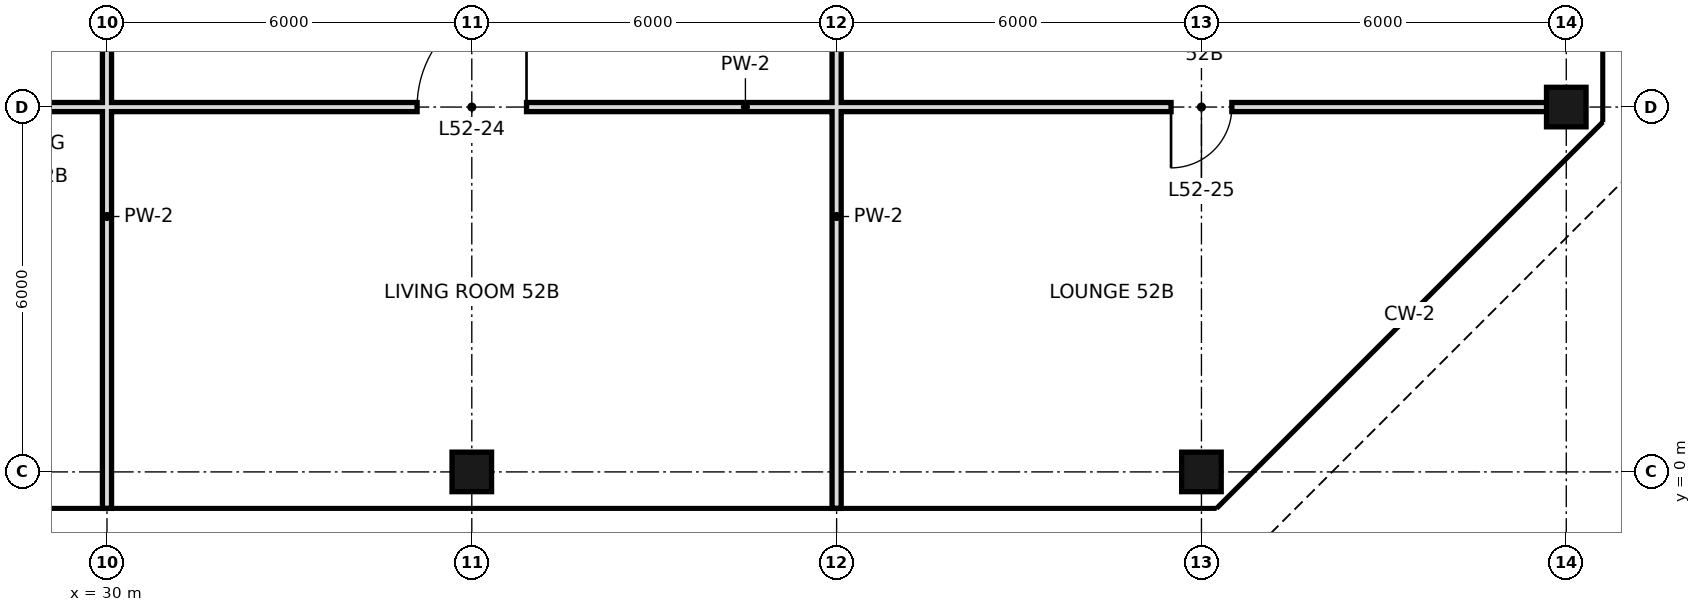
"""IFC4 building model, lengths in metres.
Left out: names, types, materials, properties, quantities, classifications, styles, units other than length and angle.
Written with IfcOpenShell. Run it as: python <this file> out.ifc"""

import sys

from ifc_helpers import new_model, si_unit, direction, frame, frame_2d, origin, origin_2d, place, context, subcontext, project, spatial, rectangle, hollow_rectangle, extrude, element, fill, save


model = new_model("IFC4")
c1 = context("Model", 3, precision=1e-05, world=origin(), true_north=direction((0.0, 1.0)))
c2 = subcontext(c1, "Body", "Model", "MODEL_VIEW")
j1 = project(units=[si_unit("LENGTHUNIT", "METRE"), si_unit("PLANEANGLEUNIT", "RADIAN")], contexts=[c1])
p1 = place(None, origin())
s1 = spatial("IfcSite", under=j1, at=p1, CompositionType="ELEMENT")
p2 = place(p1, origin())
s2 = spatial("IfcBuilding", under=s1, at=p2, CompositionType="ELEMENT")
p3 = place(p2, frame((0.0, 0.0, 222.6)))
s3 = spatial("IfcBuildingStorey", under=s2, at=p3, CompositionType="ELEMENT", Elevation=222.6)
for number, where, z_axis, x_axis in (
    (1, (36.0, 0.0, 0.0), (0.0, 0.0, 1.0), (1.0, 0.0, 0.0)),
    (2, (48.0, 0.0, 0.0), (0.0, 0.0, 1.0), (1.0, 0.0, 0.0)),
    (3, (54.0, 6.0, 0.0), (0.0, 0.0, 1.0), (1.0, 0.0, 0.0)),
):
    element("IfcColumn", number, at=place(p3, frame(where, z_axis=z_axis, x_axis=x_axis)), inside=s3, PredefinedType="COLUMN", context=c2, shape_type="SweptSolid", body=[
        extrude(hollow_rectangle(XDim=0.65, YDim=0.65, WallThickness=0.032, at=origin_2d()), origin(), (0.0, 0.0, 1.0), 3.6),
    ])
for number, where, z_axis, x_axis in (
    (4, (30.0, -0.6, 0.0), (0.0, 0.0, 1.0), (0.0, 1.0, 0.0)),
    (5, (42.0, -0.6, 0.0), (0.0, 0.0, 1.0), (0.0, 1.0, 0.0)),
):
    element("IfcWall", number, at=place(p3, frame(where, z_axis=z_axis, x_axis=x_axis)), inside=s3, PredefinedType="PARTITIONING", context=c2, shape_type="SweptSolid", body=[
        extrude(rectangle(XDim=9.6, YDim=0.15, at=frame_2d((4.8, 0.0))), origin(), (0.0, 0.0, 1.0), 2.72),
    ])
p4 = place(p3, frame((27.0, 6.0, 0.0), z_axis=(0.0, 0.0, 1.0), x_axis=(1.0, 0.0, 0.0)))
e6 = element("IfcWall", 6, at=p4, inside=s3, PredefinedType="PARTITIONING", context=c2, shape_type="SweptSolid", body=[
    extrude(rectangle(XDim=27.0, YDim=0.15, at=frame_2d((13.5, 0.0))), origin(), (0.0, 0.0, 1.0), 2.97),
])
p5 = place(p4, frame((0.7, 0.0, 0.0)))
e7 = element("IfcOpeningElement", 7, at=p5, cuts=e6, PredefinedType="OPENING", context=c2, shape_type="SweptSolid", body=[
    extrude(rectangle(XDim=1.0, YDim=2.4, at=frame_2d((0.5, 1.2))), frame((0.0, 0.085, 0.0), z_axis=(0.0, -1.0, 0.0), x_axis=(1.0, 0.0, 0.0)), (0.0, 0.0, 1.0), 0.17),
])
p6 = place(p4, frame((8.1, 0.0, 0.0)))
e8 = element("IfcOpeningElement", 8, at=p6, cuts=e6, PredefinedType="OPENING", context=c2, shape_type="SweptSolid", body=[
    extrude(rectangle(XDim=1.8, YDim=2.4, at=frame_2d((0.9, 1.2))), frame((0.0, 0.085, 0.0), z_axis=(0.0, -1.0, 0.0), x_axis=(1.0, 0.0, 0.0)), (0.0, 0.0, 1.0), 0.17),
])
p7 = place(p4, frame((20.5, 0.0, 0.0)))
e9 = element("IfcOpeningElement", 9, at=p7, cuts=e6, PredefinedType="OPENING", context=c2, shape_type="SweptSolid", body=[
    extrude(rectangle(XDim=1.0, YDim=2.4, at=frame_2d((0.5, 1.2))), frame((0.0, 0.085, 0.0), z_axis=(0.0, -1.0, 0.0), x_axis=(1.0, 0.0, 0.0)), (0.0, 0.0, 1.0), 0.17),
])
p8 = place(p6, frame((1.8, 0.0, 0.0), z_axis=(0.0, 0.0, 1.0), x_axis=(-1.0, 0.0, 0.0)))
e10 = element("IfcDoor", 10, at=p8, inside=s3, OperationType="SINGLE_SWING_LEFT", PredefinedType="DOOR", context=c2, shape_type="SweptSolid", body=[
    extrude(rectangle(XDim=1.8, YDim=2.4, at=frame_2d((0.9, 1.2))), frame((0.0, 0.025, 0.0), z_axis=(0.0, -1.0, 0.0), x_axis=(1.0, 0.0, 0.0)), (0.0, 0.0, 1.0), 0.05),
])
fill(e8, e10)
p9 = place(p7, frame((1.0, 0.0, 0.0), z_axis=(0.0, 0.0, 1.0), x_axis=(-1.0, 0.0, 0.0)))
e11 = element("IfcDoor", 11, at=p9, inside=s3, OperationType="SINGLE_SWING_RIGHT", PredefinedType="DOOR", context=c2, shape_type="SweptSolid", body=[
    extrude(rectangle(XDim=1.0, YDim=2.4, at=frame_2d((0.5, 1.2))), frame((0.0, 0.025, 0.0), z_axis=(0.0, -1.0, 0.0), x_axis=(1.0, 0.0, 0.0)), (0.0, 0.0, 1.0), 0.05),
])
fill(e9, e11)
save(model, sys.argv[1])
